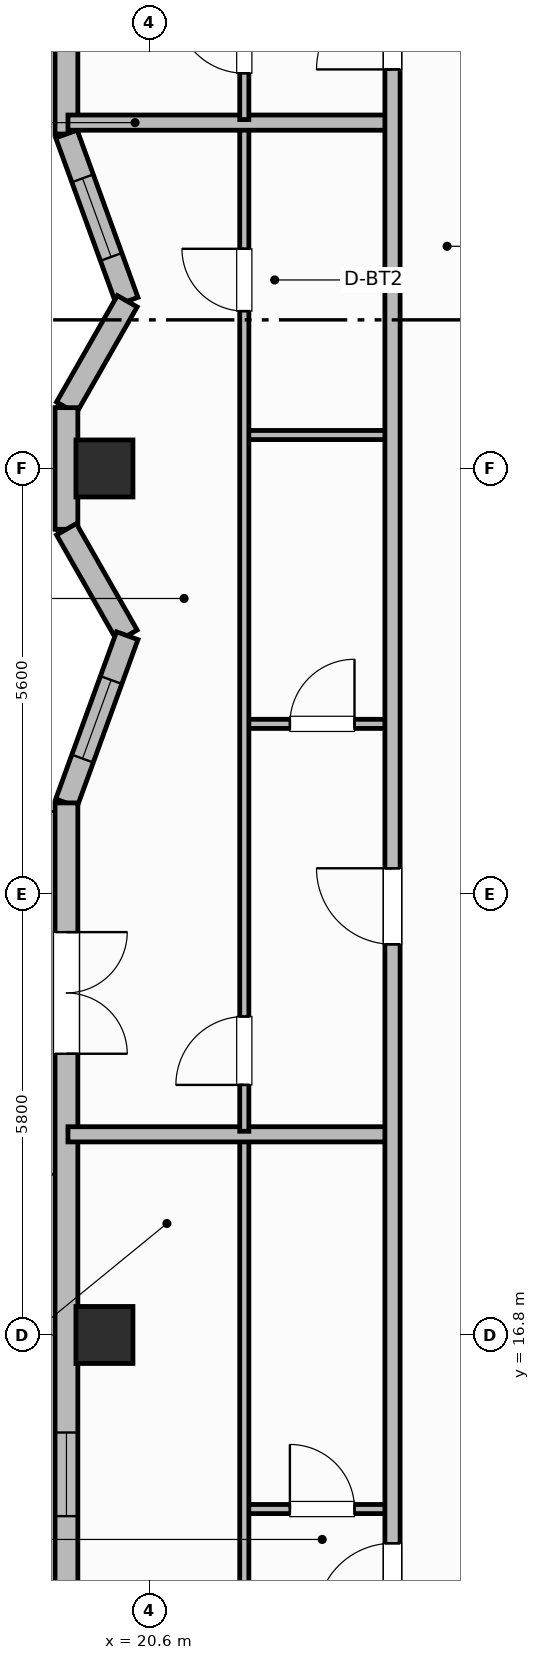
"""IFC4 building model, lengths in metres.
Left out: names, types, materials, properties, quantities, classifications, styles, units other than length and angle.
Written with IfcOpenShell. Run it as: python <this file> out.ifc"""

import sys

from ifc_helpers import new_model, si_unit, direction, frame, frame_2d, origin, origin_2d, place, context, subcontext, project, spatial, rectangle, extrude, element, fill, save


model = new_model("IFC4")
c1 = context("Model", 3, precision=1e-05, world=origin(), true_north=direction((0.0, 1.0)))
c2 = subcontext(c1, "Body", "Model", "MODEL_VIEW")
j1 = project(units=[si_unit("LENGTHUNIT", "METRE"), si_unit("PLANEANGLEUNIT", "RADIAN")], contexts=[c1])
p1 = place(None, origin())
s1 = spatial("IfcSite", under=j1, at=p1, CompositionType="ELEMENT")
p2 = place(p1, origin())
s2 = spatial("IfcBuilding", under=s1, at=p2, CompositionType="ELEMENT")
p3 = place(p2, frame((0.0, 0.0, 271.3)))
s3 = spatial("IfcBuildingStorey", under=s2, at=p3, CompositionType="ELEMENT", Elevation=271.3)
for number, where, z_axis, x_axis in (
    (1, (20.01, 16.8, 0.0), (0.0, 0.0, 1.0), (1.0, 0.0, 0.0)),
    (2, (20.01, 28.2, 0.0), (0.0, 0.0, 1.0), (1.0, 0.0, 0.0)),
):
    element("IfcColumn", number, at=place(p3, frame(where, z_axis=z_axis, x_axis=x_axis)), inside=s3, PredefinedType="COLUMN", context=c2, shape_type="SweptSolid", body=[
        extrude(rectangle(XDim=0.75, YDim=0.75, at=origin_2d()), origin(), (0.0, 0.0, 1.0), 3.7),
    ])
p4 = place(p3, frame((19.51, 43.72, 0.0), z_axis=(0.0, 0.0, 1.0), x_axis=(0.0, -1.0, 0.0)))
e3 = element("IfcWall", 3, at=p4, inside=s3, PredefinedType="SOLIDWALL", context=c2, shape_type="SweptSolid", body=[
    extrude(rectangle(XDim=11.12, YDim=0.3, at=frame_2d((5.56, 0.0))), origin(), (0.0, 0.0, 1.0), 2.73),
])
p5 = place(p4, frame((1.237, 0.0, 0.76)))
e4 = element("IfcOpeningElement", 4, at=p5, cuts=e3, PredefinedType="OPENING", context=c2, shape_type="SweptSolid", body=[
    extrude(rectangle(XDim=1.4, YDim=1.85, at=frame_2d((0.7, 0.925))), frame((0.0, 0.16, 0.0), z_axis=(0.0, -1.0, 0.0), x_axis=(1.0, 0.0, 0.0)), (0.0, 0.0, 1.0), 0.32),
])
p6 = place(p4, frame((5.91, 0.0, 0.76)))
e5 = element("IfcOpeningElement", 5, at=p6, cuts=e3, PredefinedType="OPENING", context=c2, shape_type="SweptSolid", body=[
    extrude(rectangle(XDim=1.4, YDim=1.85, at=frame_2d((0.7, 0.925))), frame((0.0, 0.16, 0.0), z_axis=(0.0, -1.0, 0.0), x_axis=(1.0, 0.0, 0.0)), (0.0, 0.0, 1.0), 0.32),
])
p7 = place(p4, frame((8.133, 0.0, 0.76)))
e6 = element("IfcOpeningElement", 6, at=p7, cuts=e3, PredefinedType="OPENING", context=c2, shape_type="SweptSolid", body=[
    extrude(rectangle(XDim=1.4, YDim=1.85, at=frame_2d((0.7, 0.925))), frame((0.0, 0.16, 0.0), z_axis=(0.0, -1.0, 0.0), x_axis=(1.0, 0.0, 0.0)), (0.0, 0.0, 1.0), 0.32),
])
p8 = place(p3, frame((19.51, 32.6, 0.0), z_axis=(0.0, 0.0, 1.0), x_axis=(0.341734690003, -0.939796468204, 0.0)))
e7 = element("IfcWall", 7, at=p8, inside=s3, PredefinedType="SOLIDWALL", context=c2, shape_type="SweptSolid", body=[
    extrude(rectangle(XDim=2.341, YDim=0.3, at=frame_2d((1.17, 0.0))), origin(), (0.0, 0.0, 1.0), 2.73),
])
p9 = place(p8, frame((0.621, 0.0, 0.92)))
e8 = element("IfcOpeningElement", 8, at=p9, cuts=e7, PredefinedType="OPENING", context=c2, shape_type="SweptSolid", body=[
    extrude(rectangle(XDim=1.1, YDim=1.65, at=frame_2d((0.55, 0.825))), frame((0.0, 0.16, 0.0), z_axis=(0.0, -1.0, 0.0), x_axis=(1.0, 0.0, 0.0)), (0.0, 0.0, 1.0), 0.32),
])
p10 = place(p3, frame((20.31, 30.4, 0.0), z_axis=(0.0, 0.0, 1.0), x_axis=(-0.496187856351, -0.868215187157, 0.0)))
e9 = element("IfcWall", 9, at=p10, inside=s3, PredefinedType="SOLIDWALL", context=c2, shape_type="SweptSolid", body=[
    extrude(rectangle(XDim=1.612, YDim=0.3, at=frame_2d((0.806, 0.0))), origin(), (0.0, 0.0, 1.0), 2.73),
])
p11 = place(p3, frame((19.51, 29.0, 0.0), z_axis=(0.0, 0.0, 1.0), x_axis=(0.0, -1.0, 0.0)))
e10 = element("IfcWall", 10, at=p11, inside=s3, PredefinedType="SOLIDWALL", context=c2, shape_type="SweptSolid", body=[
    extrude(rectangle(XDim=1.6, YDim=0.3, at=frame_2d((0.8, 0.0))), origin(), (0.0, 0.0, 1.0), 2.73),
])
p12 = place(p3, frame((19.51, 27.4, 0.0), z_axis=(0.0, 0.0, 1.0), x_axis=(0.496187856351, -0.868215187157, 0.0)))
e11 = element("IfcWall", 11, at=p12, inside=s3, PredefinedType="SOLIDWALL", context=c2, shape_type="SweptSolid", body=[
    extrude(rectangle(XDim=1.612, YDim=0.3, at=frame_2d((0.806, 0.0))), origin(), (0.0, 0.0, 1.0), 2.73),
])
p13 = place(p3, frame((20.31, 26.0, 0.0), z_axis=(0.0, 0.0, 1.0), x_axis=(-0.341768184638, -0.939784287999, 0.0)))
e12 = element("IfcWall", 12, at=p13, inside=s3, PredefinedType="SOLIDWALL", context=c2, shape_type="SweptSolid", body=[
    extrude(rectangle(XDim=2.341, YDim=0.3, at=frame_2d((1.17, 0.0))), origin(), (0.0, 0.0, 1.0), 2.73),
])
p14 = place(p13, frame((0.621, 0.0, 0.92)))
e13 = element("IfcOpeningElement", 13, at=p14, cuts=e12, PredefinedType="OPENING", context=c2, shape_type="SweptSolid", body=[
    extrude(rectangle(XDim=1.1, YDim=1.65, at=frame_2d((0.55, 0.825))), frame((0.0, 0.16, 0.0), z_axis=(0.0, -1.0, 0.0), x_axis=(1.0, 0.0, 0.0)), (0.0, 0.0, 1.0), 0.32),
])
p15 = place(p3, frame((19.51, 23.8, 0.0), z_axis=(0.0, 0.0, 1.0), x_axis=(0.0, -1.0, 0.0)))
e14 = element("IfcWall", 14, at=p15, inside=s3, PredefinedType="SOLIDWALL", context=c2, shape_type="SweptSolid", body=[
    extrude(rectangle(XDim=11.12, YDim=0.3, at=frame_2d((5.56, 0.0))), origin(), (0.0, 0.0, 1.0), 2.73),
])
p16 = place(p15, frame((1.7, 0.0, 0.0)))
e15 = element("IfcOpeningElement", 15, at=p16, cuts=e14, PredefinedType="OPENING", context=c2, shape_type="SweptSolid", body=[
    extrude(rectangle(XDim=1.6, YDim=2.1, at=frame_2d((0.8, 1.05))), frame((0.0, 0.16, 0.0), z_axis=(0.0, -1.0, 0.0), x_axis=(1.0, 0.0, 0.0)), (0.0, 0.0, 1.0), 0.32),
])
p17 = place(p15, frame((8.283, 0.0, 0.95)))
e16 = element("IfcOpeningElement", 16, at=p17, cuts=e14, PredefinedType="OPENING", context=c2, shape_type="SweptSolid", body=[
    extrude(rectangle(XDim=1.1, YDim=1.65, at=frame_2d((0.55, 0.825))), frame((0.0, 0.16, 0.0), z_axis=(0.0, -1.0, 0.0), x_axis=(1.0, 0.0, 0.0)), (0.0, 0.0, 1.0), 0.32),
])
p18 = place(p3, frame((21.85, 14.51, 0.0), z_axis=(0.0, 0.0, 1.0), x_axis=(1.0, 0.0, 0.0)))
e17 = element("IfcWall", 17, at=p18, inside=s3, PredefinedType="PARTITIONING", context=c2, shape_type="SweptSolid", body=[
    extrude(rectangle(XDim=1.95, YDim=0.12, at=frame_2d((0.975, 0.0))), origin(), (0.0, 0.0, 1.0), 2.56),
])
p19 = place(p18, frame((0.6, 0.0, 0.0)))
e18 = element("IfcOpeningElement", 18, at=p19, cuts=e17, PredefinedType="OPENING", context=c2, shape_type="SweptSolid", body=[
    extrude(rectangle(XDim=0.85, YDim=2.1, at=frame_2d((0.425, 1.05))), frame((0.0, 0.07, 0.0), z_axis=(0.0, -1.0, 0.0), x_axis=(1.0, 0.0, 0.0)), (0.0, 0.0, 1.0), 0.14),
])
p20 = place(p3, frame((21.85, 9.99, 0.0), z_axis=(0.0, 0.0, 1.0), x_axis=(0.0, 1.0, 0.0)))
e19 = element("IfcWall", 19, at=p20, inside=s3, PredefinedType="PARTITIONING", context=c2, shape_type="SweptSolid", body=[
    extrude(rectangle(XDim=9.41, YDim=0.12, at=frame_2d((4.705, 0.0))), origin(), (0.0, 0.0, 1.0), 2.56),
])
p21 = place(p20, frame((0.41, 0.0, 0.0)))
e20 = element("IfcOpeningElement", 20, at=p21, cuts=e19, PredefinedType="OPENING", context=c2, shape_type="SweptSolid", body=[
    extrude(rectangle(XDim=0.9, YDim=2.1, at=frame_2d((0.45, 1.05))), frame((0.0, 0.07, 0.0), z_axis=(0.0, -1.0, 0.0), x_axis=(1.0, 0.0, 0.0)), (0.0, 0.0, 1.0), 0.14),
])
p22 = place(p3, frame((19.53, 19.44, 0.0), z_axis=(0.0, 0.0, 1.0), x_axis=(1.0, 0.0, 0.0)))
e21 = element("IfcWall", 21, at=p22, inside=s3, PredefinedType="PARTITIONING", context=c2, shape_type="SweptSolid", body=[
    extrude(rectangle(XDim=4.27, YDim=0.2, at=frame_2d((2.135, 0.0))), origin(), (0.0, 0.0, 1.0), 2.56),
])
p23 = place(p3, frame((21.85, 24.84, 0.0), z_axis=(0.0, 0.0, 1.0), x_axis=(1.0, 0.0, 0.0)))
e22 = element("IfcWall", 22, at=p23, inside=s3, PredefinedType="PARTITIONING", context=c2, shape_type="SweptSolid", body=[
    extrude(rectangle(XDim=1.95, YDim=0.12, at=frame_2d((0.975, 0.0))), origin(), (0.0, 0.0, 1.0), 2.56),
])
p24 = place(p23, frame((0.6, 0.0, 0.0)))
e23 = element("IfcOpeningElement", 23, at=p24, cuts=e22, PredefinedType="OPENING", context=c2, shape_type="SweptSolid", body=[
    extrude(rectangle(XDim=0.85, YDim=2.1, at=frame_2d((0.425, 1.05))), frame((0.0, 0.07, 0.0), z_axis=(0.0, -1.0, 0.0), x_axis=(1.0, 0.0, 0.0)), (0.0, 0.0, 1.0), 0.14),
])
p25 = place(p3, frame((21.85, 28.64, 0.0), z_axis=(0.0, 0.0, 1.0), x_axis=(1.0, 0.0, 0.0)))
e24 = element("IfcWall", 24, at=p25, inside=s3, PredefinedType="PARTITIONING", context=c2, shape_type="SweptSolid", body=[
    extrude(rectangle(XDim=1.95, YDim=0.12, at=frame_2d((0.975, 0.0))), origin(), (0.0, 0.0, 1.0), 2.56),
])
p26 = place(p3, frame((21.85, 19.48, 0.0), z_axis=(0.0, 0.0, 1.0), x_axis=(0.0, 1.0, 0.0)))
e25 = element("IfcWall", 25, at=p26, inside=s3, PredefinedType="PARTITIONING", context=c2, shape_type="SweptSolid", body=[
    extrude(rectangle(XDim=13.23, YDim=0.12, at=frame_2d((6.615, 0.0))), origin(), (0.0, 0.0, 1.0), 2.56),
])
p27 = place(p26, frame((0.61, 0.0, 0.0)))
e26 = element("IfcOpeningElement", 26, at=p27, cuts=e25, PredefinedType="OPENING", context=c2, shape_type="SweptSolid", body=[
    extrude(rectangle(XDim=0.9, YDim=2.1, at=frame_2d((0.45, 1.05))), frame((0.0, 0.07, 0.0), z_axis=(0.0, -1.0, 0.0), x_axis=(1.0, 0.0, 0.0)), (0.0, 0.0, 1.0), 0.14),
])
p28 = place(p26, frame((10.79, 0.0, 0.0)))
e27 = element("IfcOpeningElement", 27, at=p28, cuts=e25, PredefinedType="OPENING", context=c2, shape_type="SweptSolid", body=[
    extrude(rectangle(XDim=0.82, YDim=2.08, at=frame_2d((0.41, 1.04))), frame((0.0, 0.07, 0.0), z_axis=(0.0, -1.0, 0.0), x_axis=(1.0, 0.0, 0.0)), (0.0, 0.0, 1.0), 0.14),
])
p29 = place(p3, frame((19.53, 32.75, 0.0), z_axis=(0.0, 0.0, 1.0), x_axis=(1.0, 0.0, 0.0)))
e28 = element("IfcWall", 28, at=p29, inside=s3, PredefinedType="PARTITIONING", context=c2, shape_type="SweptSolid", body=[
    extrude(rectangle(XDim=4.27, YDim=0.2, at=frame_2d((2.135, 0.0))), origin(), (0.0, 0.0, 1.0), 2.56),
])
p30 = place(p3, frame((21.85, 32.79, 0.0), z_axis=(0.0, 0.0, 1.0), x_axis=(0.0, 1.0, 0.0)))
e29 = element("IfcWall", 29, at=p30, inside=s3, PredefinedType="PARTITIONING", context=c2, shape_type="SweptSolid", body=[
    extrude(rectangle(XDim=5.42, YDim=0.12, at=frame_2d((2.71, 0.0))), origin(), (0.0, 0.0, 1.0), 2.56),
])
p31 = place(p30, frame((0.61, 0.0, 0.0)))
e30 = element("IfcOpeningElement", 30, at=p31, cuts=e29, PredefinedType="OPENING", context=c2, shape_type="SweptSolid", body=[
    extrude(rectangle(XDim=0.9, YDim=2.1, at=frame_2d((0.45, 1.05))), frame((0.0, 0.07, 0.0), z_axis=(0.0, -1.0, 0.0), x_axis=(1.0, 0.0, 0.0)), (0.0, 0.0, 1.0), 0.14),
])
p32 = place(p3, frame((23.8, 9.95, 0.0), z_axis=(0.0, 0.0, 1.0), x_axis=(0.0, 1.0, 0.0)))
e31 = element("IfcWall", 31, at=p32, inside=s3, PredefinedType="PARTITIONING", context=c2, shape_type="SweptSolid", body=[
    extrude(rectangle(XDim=36.5, YDim=0.2, at=frame_2d((18.25, 0.0))), origin(), (0.0, 0.0, 1.0), 2.56),
])
p33 = place(p32, frame((3.11, 0.0, 0.0)))
e32 = element("IfcOpeningElement", 32, at=p33, cuts=e31, PredefinedType="OPENING", context=c2, shape_type="SweptSolid", body=[
    extrude(rectangle(XDim=1.0, YDim=2.15, at=frame_2d((0.5, 1.075))), frame((0.0, 0.11, 0.0), z_axis=(0.0, -1.0, 0.0), x_axis=(1.0, 0.0, 0.0)), (0.0, 0.0, 1.0), 0.22),
])
p34 = place(p32, frame((11.99, 0.0, 0.0)))
e33 = element("IfcOpeningElement", 33, at=p34, cuts=e31, PredefinedType="OPENING", context=c2, shape_type="SweptSolid", body=[
    extrude(rectangle(XDim=1.0, YDim=2.15, at=frame_2d((0.5, 1.075))), frame((0.0, 0.11, 0.0), z_axis=(0.0, -1.0, 0.0), x_axis=(1.0, 0.0, 0.0)), (0.0, 0.0, 1.0), 0.22),
])
p35 = place(p32, frame((23.5, 0.0, 0.0)))
e34 = element("IfcOpeningElement", 34, at=p35, cuts=e31, PredefinedType="OPENING", context=c2, shape_type="SweptSolid", body=[
    extrude(rectangle(XDim=1.0, YDim=2.15, at=frame_2d((0.5, 1.075))), frame((0.0, 0.11, 0.0), z_axis=(0.0, -1.0, 0.0), x_axis=(1.0, 0.0, 0.0)), (0.0, 0.0, 1.0), 0.22),
])
p36 = place(p32, frame((31.2, 0.0, 0.0)))
e35 = element("IfcOpeningElement", 35, at=p36, cuts=e31, PredefinedType="OPENING", context=c2, shape_type="SweptSolid", body=[
    extrude(rectangle(XDim=1.0, YDim=2.15, at=frame_2d((0.5, 1.075))), frame((0.0, 0.11, 0.0), z_axis=(0.0, -1.0, 0.0), x_axis=(1.0, 0.0, 0.0)), (0.0, 0.0, 1.0), 0.22),
])
p37 = place(p9, origin())
e36 = element("IfcWindow", 36, at=p37, inside=s3, PartitioningType="SINGLE_PANEL", PredefinedType="WINDOW", context=c2, shape_type="SweptSolid", body=[
    extrude(rectangle(XDim=1.1, YDim=1.65, at=frame_2d((0.55, 0.825))), frame((0.0, 0.03, 0.0), z_axis=(0.0, -1.0, 0.0), x_axis=(1.0, 0.0, 0.0)), (0.0, 0.0, 1.0), 0.06),
])
fill(e8, e36)
p38 = place(p14, origin())
e37 = element("IfcWindow", 37, at=p38, inside=s3, PartitioningType="SINGLE_PANEL", PredefinedType="WINDOW", context=c2, shape_type="SweptSolid", body=[
    extrude(rectangle(XDim=1.1, YDim=1.65, at=frame_2d((0.55, 0.825))), frame((0.0, 0.03, 0.0), z_axis=(0.0, -1.0, 0.0), x_axis=(1.0, 0.0, 0.0)), (0.0, 0.0, 1.0), 0.06),
])
fill(e13, e37)
p39 = place(p16, origin())
e38 = element("IfcDoor", 38, at=p39, inside=s3, OperationType="DOUBLE_DOOR_SINGLE_SWING", PredefinedType="DOOR", context=c2, shape_type="SweptSolid", body=[
    extrude(rectangle(XDim=1.6, YDim=2.1, at=frame_2d((0.8, 1.05))), frame((0.0, 0.025, 0.0), z_axis=(0.0, -1.0, 0.0), x_axis=(1.0, 0.0, 0.0)), (0.0, 0.0, 1.0), 0.05),
])
fill(e15, e38)
p40 = place(p17, origin())
e39 = element("IfcWindow", 39, at=p40, inside=s3, PartitioningType="SINGLE_PANEL", PredefinedType="WINDOW", context=c2, shape_type="SweptSolid", body=[
    extrude(rectangle(XDim=1.1, YDim=1.65, at=frame_2d((0.55, 0.825))), frame((0.0, 0.03, 0.0), z_axis=(0.0, -1.0, 0.0), x_axis=(1.0, 0.0, 0.0)), (0.0, 0.0, 1.0), 0.06),
])
fill(e16, e39)
p41 = place(p19, origin())
e40 = element("IfcDoor", 40, at=p41, inside=s3, OperationType="SINGLE_SWING_LEFT", PredefinedType="DOOR", context=c2, shape_type="SweptSolid", body=[
    extrude(rectangle(XDim=0.85, YDim=2.1, at=frame_2d((0.425, 1.05))), frame((0.0, 0.025, 0.0), z_axis=(0.0, -1.0, 0.0), x_axis=(1.0, 0.0, 0.0)), (0.0, 0.0, 1.0), 0.05),
])
fill(e18, e40)
p42 = place(p24, origin())
e41 = element("IfcDoor", 41, at=p42, inside=s3, OperationType="SINGLE_SWING_RIGHT", PredefinedType="DOOR", context=c2, shape_type="SweptSolid", body=[
    extrude(rectangle(XDim=0.85, YDim=2.1, at=frame_2d((0.425, 1.05))), frame((0.0, 0.025, 0.0), z_axis=(0.0, -1.0, 0.0), x_axis=(1.0, 0.0, 0.0)), (0.0, 0.0, 1.0), 0.05),
])
fill(e23, e41)
p43 = place(p27, origin())
e42 = element("IfcDoor", 42, at=p43, inside=s3, OperationType="SINGLE_SWING_LEFT", PredefinedType="DOOR", context=c2, shape_type="SweptSolid", body=[
    extrude(rectangle(XDim=0.9, YDim=2.1, at=frame_2d((0.45, 1.05))), frame((0.0, 0.025, 0.0), z_axis=(0.0, -1.0, 0.0), x_axis=(1.0, 0.0, 0.0)), (0.0, 0.0, 1.0), 0.05),
])
fill(e26, e42)
p44 = place(p28, origin())
e43 = element("IfcDoor", 43, at=p44, inside=s3, OperationType="SINGLE_SWING_RIGHT", PredefinedType="DOOR", context=c2, shape_type="SweptSolid", body=[
    extrude(rectangle(XDim=0.82, YDim=2.08, at=frame_2d((0.41, 1.04))), frame((0.0, 0.025, 0.0), z_axis=(0.0, -1.0, 0.0), x_axis=(1.0, 0.0, 0.0)), (0.0, 0.0, 1.0), 0.05),
])
fill(e27, e43)
p45 = place(p31, origin())
e44 = element("IfcDoor", 44, at=p45, inside=s3, OperationType="SINGLE_SWING_RIGHT", PredefinedType="DOOR", context=c2, shape_type="SweptSolid", body=[
    extrude(rectangle(XDim=0.9, YDim=2.1, at=frame_2d((0.45, 1.05))), frame((0.0, 0.025, 0.0), z_axis=(0.0, -1.0, 0.0), x_axis=(1.0, 0.0, 0.0)), (0.0, 0.0, 1.0), 0.05),
])
fill(e30, e44)
p46 = place(p33, origin())
e45 = element("IfcDoor", 45, at=p46, inside=s3, OperationType="SINGLE_SWING_LEFT", PredefinedType="DOOR", context=c2, shape_type="SweptSolid", body=[
    extrude(rectangle(XDim=1.0, YDim=2.15, at=frame_2d((0.5, 1.075))), frame((0.0, 0.025, 0.0), z_axis=(0.0, -1.0, 0.0), x_axis=(1.0, 0.0, 0.0)), (0.0, 0.0, 1.0), 0.05),
])
fill(e32, e45)
p47 = place(p34, origin())
e46 = element("IfcDoor", 46, at=p47, inside=s3, OperationType="SINGLE_SWING_RIGHT", PredefinedType="DOOR", context=c2, shape_type="SweptSolid", body=[
    extrude(rectangle(XDim=1.0, YDim=2.15, at=frame_2d((0.5, 1.075))), frame((0.0, 0.025, 0.0), z_axis=(0.0, -1.0, 0.0), x_axis=(1.0, 0.0, 0.0)), (0.0, 0.0, 1.0), 0.05),
])
fill(e33, e46)
p48 = place(p35, origin())
e47 = element("IfcDoor", 47, at=p48, inside=s3, OperationType="SINGLE_SWING_LEFT", PredefinedType="DOOR", context=c2, shape_type="SweptSolid", body=[
    extrude(rectangle(XDim=1.0, YDim=2.15, at=frame_2d((0.5, 1.075))), frame((0.0, 0.025, 0.0), z_axis=(0.0, -1.0, 0.0), x_axis=(1.0, 0.0, 0.0)), (0.0, 0.0, 1.0), 0.05),
])
fill(e34, e47)
save(model, sys.argv[1])
